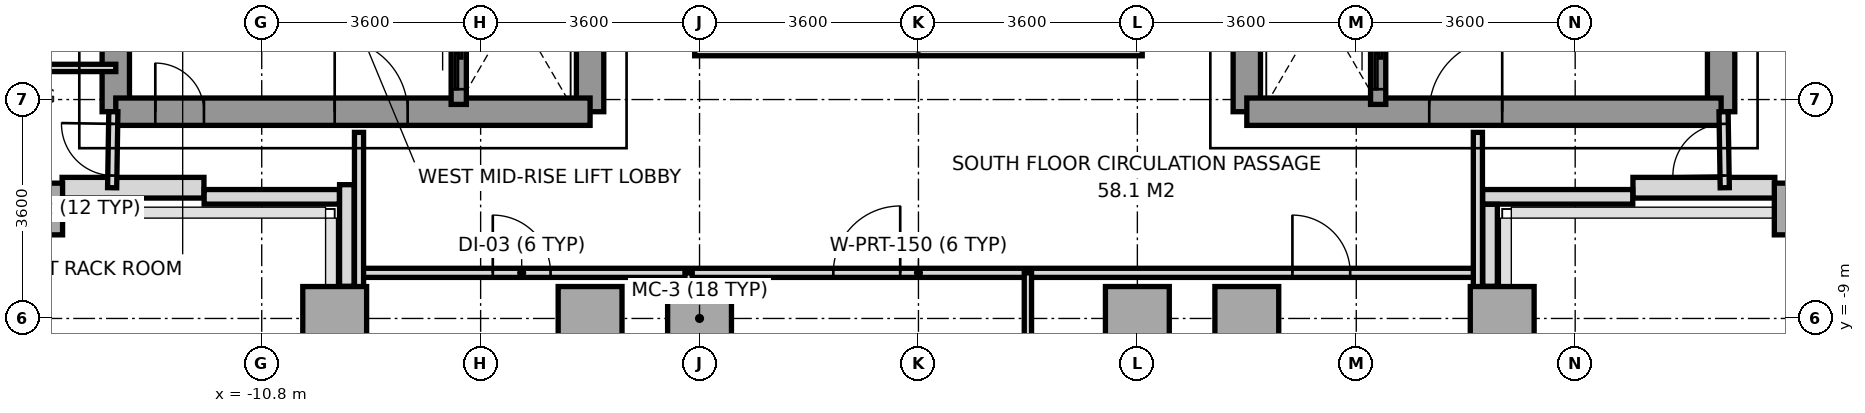
"""IFC4 building model, lengths in metres.
Left out: names, types, materials, properties, quantities, classifications, styles, units other than length and angle.
Written with IfcOpenShell. Run it as: python <this file> out.ifc"""

import sys

from ifc_helpers import new_model, si_unit, direction, frame, frame_2d, origin, origin_2d, place, context, subcontext, project, spatial, rectangle, extrude, source, transform, mapped, element, fill, save


model = new_model("IFC4")
c1 = context("Model", 3, precision=1e-05, world=origin(), true_north=direction((0.0, 1.0)))
c2 = subcontext(c1, "Body", "Model", "MODEL_VIEW")
j1 = project(units=[si_unit("LENGTHUNIT", "METRE"), si_unit("PLANEANGLEUNIT", "RADIAN")], contexts=[c1])
p1 = place(None, origin())
s1 = spatial("IfcSite", under=j1, at=p1, CompositionType="ELEMENT")
p2 = place(p1, origin())
s2 = spatial("IfcBuilding", under=s1, at=p2, CompositionType="ELEMENT")
p3 = place(p2, frame((0.0, 0.0, 148.2)))
s3 = spatial("IfcBuildingStorey", under=s2, at=p3, CompositionType="ELEMENT", Elevation=148.2)
m1 = source(origin(), c2, "Body", "SweptSolid", [
    extrude(rectangle(XDim=0.65, YDim=0.85, at=origin_2d()), origin(), (0.0, 0.0, 1.0), 3.14),
])
p4 = place(p3, frame((-14.4, -7.2, 0.0), z_axis=(0.0, 0.0, 1.0), x_axis=(1.0, 0.0, 0.0)))
e1 = element("IfcColumn", 1, at=p4, inside=s3, PredefinedType="COLUMN", context=c2, shape_type="MappedRepresentation", body=[
    mapped(m1, transform((0.0, 0.0, 0.0), x_axis=(1.0, 0.0, 0.0), y_axis=(0.0, 1.0, 0.0), z_axis=(0.0, 0.0, 1.0), scale=1.0)),
])
m2 = source(origin(), c2, "Body", "SweptSolid", [
    extrude(rectangle(XDim=1.05, YDim=1.05, at=origin_2d()), origin(), (0.0, 0.0, 1.0), 3.14),
])
for number, where, z_axis, x_axis in (
    (2, (-9.6, -9.0, 0.0), (0.0, 0.0, 1.0), (1.0, 0.0, 0.0)),
    (3, (-5.4, -9.0, 0.0), (0.0, 0.0, 1.0), (1.0, 0.0, 0.0)),
    (4, (-3.6, -9.0, 0.0), (0.0, 0.0, 1.0), (1.0, 0.0, 0.0)),
    (5, (3.6, -9.0, 0.0), (0.0, 0.0, 1.0), (1.0, 0.0, 0.0)),
    (6, (5.4, -9.0, 0.0), (0.0, 0.0, 1.0), (1.0, 0.0, 0.0)),
    (7, (9.6, -9.0, 0.0), (0.0, 0.0, 1.0), (1.0, 0.0, 0.0)),
):
    element("IfcColumn", number, at=place(p3, frame(where, z_axis=z_axis, x_axis=x_axis)), inside=s3, PredefinedType="COLUMN", context=c2, shape_type="MappedRepresentation", body=[
        mapped(m2, transform((0.0, 0.0, 0.0), x_axis=(1.0, 0.0, 0.0), y_axis=(0.0, 1.0, 0.0), z_axis=(0.0, 0.0, 1.0), scale=1.0)),
    ])
p5 = place(p3, frame((14.4, -7.2, 0.0), z_axis=(0.0, 0.0, 1.0), x_axis=(1.0, 0.0, 0.0)))
e8 = element("IfcColumn", 8, at=p5, inside=s3, PredefinedType="COLUMN", context=c2, shape_type="MappedRepresentation", body=[
    mapped(m1, transform((0.0, 0.0, 0.0), x_axis=(1.0, 0.0, 0.0), y_axis=(0.0, 1.0, 0.0), z_axis=(0.0, 0.0, 1.0), scale=1.0)),
])
for number, where, z_axis, x_axis in (
    (9, (-14.083, -6.85, 0.0), (0.0, 0.0, 1.0), (1.0, 0.0, 0.0)),
    (10, (11.75, -6.85, 0.0), (0.0, 0.0, 1.0), (1.0, 0.0, 0.0)),
):
    element("IfcWall", number, at=place(p3, frame(where, z_axis=z_axis, x_axis=x_axis)), inside=s3, PredefinedType="SOLIDWALL", context=c2, shape_type="SweptSolid", body=[
        extrude(rectangle(XDim=2.333, YDim=0.34, at=frame_2d((1.167, 0.0))), origin(), (0.0, 0.0, 1.0), 3.14),
    ])
p6 = place(p3, frame((11.747, -7.0, 0.0), z_axis=(0.0, 0.0, 1.0), x_axis=(-1.0, 0.0, 0.0)))
e11 = element("IfcWall", 11, at=p6, inside=s3, PredefinedType="PARAPET", context=c2, shape_type="SweptSolid", body=[
    extrude(rectangle(XDim=2.469, YDim=0.24, at=frame_2d((1.234, 0.0))), origin(), (0.0, 0.0, 1.0), 1.15),
])
p7 = place(p3, frame((9.4, -7.123, 0.0), z_axis=(0.0, 0.0, 1.0), x_axis=(0.0, -1.0, 0.0)))
e12 = element("IfcWall", 12, at=p7, inside=s3, PredefinedType="PARAPET", context=c2, shape_type="SweptSolid", body=[
    extrude(rectangle(XDim=1.349, YDim=0.24, at=frame_2d((0.674, 0.0))), origin(), (0.0, 0.0, 1.0), 1.15),
])
p8 = place(p3, frame((-9.4, -8.472, 0.0), z_axis=(0.0, 0.0, 1.0), x_axis=(0.0, 1.0, 0.0)))
e13 = element("IfcWall", 13, at=p8, inside=s3, PredefinedType="PARAPET", context=c2, shape_type="SweptSolid", body=[
    extrude(rectangle(XDim=1.672, YDim=0.24, at=frame_2d((0.836, 0.0))), origin(), (0.0, 0.0, 1.0), 1.15),
])
p9 = place(p3, frame((-9.523, -7.0, 0.0), z_axis=(0.0, 0.0, 1.0), x_axis=(-1.0, 0.0, 0.0)))
e14 = element("IfcWall", 14, at=p9, inside=s3, PredefinedType="PARAPET", context=c2, shape_type="SweptSolid", body=[
    extrude(rectangle(XDim=2.224, YDim=0.24, at=frame_2d((1.112, 0.0))), origin(), (0.0, 0.0, 1.0), 1.15),
])
p10 = place(p3, frame((-13.2, -5.6, 0.0), z_axis=(0.0, 0.0, 1.0), x_axis=(0.0, 1.0, 0.0)))
e15 = element("IfcWall", 15, at=p10, inside=s3, PredefinedType="SHEAR", context=c2, shape_type="SweptSolid", body=[
    extrude(rectangle(XDim=11.2, YDim=0.45, at=frame_2d((5.6, 0.0))), origin(), (0.0, 0.0, 1.0), 3.14),
])
p11 = place(p3, frame((-5.4, -5.6, 0.0), z_axis=(0.0, 0.0, 1.0), x_axis=(0.0, 1.0, 0.0)))
e16 = element("IfcWall", 16, at=p11, inside=s3, PredefinedType="SHEAR", context=c2, shape_type="SweptSolid", body=[
    extrude(rectangle(XDim=12.5, YDim=0.45, at=frame_2d((6.25, 0.0))), origin(), (0.0, 0.0, 1.0), 3.14),
])
p12 = place(p11, frame((4.55, 0.0, 0.0)))
e17 = element("IfcOpeningElement", 17, at=p12, cuts=e16, PredefinedType="OPENING", context=c2, shape_type="SweptSolid", body=[
    extrude(rectangle(XDim=1.2, YDim=2.2, at=frame_2d((0.6, 1.1))), frame((0.0, 0.235, 0.0), z_axis=(0.0, -1.0, 0.0), x_axis=(1.0, 0.0, 0.0)), (0.0, 0.0, 1.0), 0.47),
])
p13 = place(p11, frame((6.86, 0.0, 0.0)))
e18 = element("IfcOpeningElement", 18, at=p13, cuts=e16, PredefinedType="OPENING", context=c2, shape_type="SweptSolid", body=[
    extrude(rectangle(XDim=0.8, YDim=2.1, at=frame_2d((0.4, 1.05))), frame((0.0, 0.235, 0.0), z_axis=(0.0, -1.0, 0.0), x_axis=(1.0, 0.0, 0.0)), (0.0, 0.0, 1.0), 0.47),
])
p14 = place(p3, frame((-13.2, -5.6, 0.0), z_axis=(0.0, 0.0, 1.0), x_axis=(1.0, 0.0, 0.0)))
e19 = element("IfcWall", 19, at=p14, inside=s3, PredefinedType="SHEAR", context=c2, shape_type="SweptSolid", body=[
    extrude(rectangle(XDim=7.8, YDim=0.45, at=frame_2d((3.9, 0.0))), origin(), (0.0, 0.0, 1.0), 3.14),
])
p15 = place(p14, frame((3.6, 0.0, 0.0)))
e20 = element("IfcOpeningElement", 20, at=p15, cuts=e19, PredefinedType="OPENING", context=c2, shape_type="SweptSolid", body=[
    extrude(rectangle(XDim=1.2, YDim=2.2, at=frame_2d((0.6, 1.1))), frame((0.0, 0.235, 0.0), z_axis=(0.0, -1.0, 0.0), x_axis=(1.0, 0.0, 0.0)), (0.0, 0.0, 1.0), 0.47),
])
p16 = place(p14, frame((0.65, 0.0, 0.0)))
e21 = element("IfcOpeningElement", 21, at=p16, cuts=e19, PredefinedType="OPENING", context=c2, shape_type="SweptSolid", body=[
    extrude(rectangle(XDim=0.8, YDim=2.1, at=frame_2d((0.4, 1.05))), frame((0.0, 0.235, 0.0), z_axis=(0.0, -1.0, 0.0), x_axis=(1.0, 0.0, 0.0)), (0.0, 0.0, 1.0), 0.47),
])
p17 = place(p3, frame((13.2, -5.6, 0.0), z_axis=(0.0, 0.0, 1.0), x_axis=(0.0, 1.0, 0.0)))
e22 = element("IfcWall", 22, at=p17, inside=s3, PredefinedType="SHEAR", context=c2, shape_type="SweptSolid", body=[
    extrude(rectangle(XDim=11.2, YDim=0.45, at=frame_2d((5.6, 0.0))), origin(), (0.0, 0.0, 1.0), 3.14),
])
p18 = place(p3, frame((5.4, -5.6, 0.0), z_axis=(0.0, 0.0, 1.0), x_axis=(0.0, 1.0, 0.0)))
e23 = element("IfcWall", 23, at=p18, inside=s3, PredefinedType="SHEAR", context=c2, shape_type="SweptSolid", body=[
    extrude(rectangle(XDim=12.5, YDim=0.45, at=frame_2d((6.25, 0.0))), origin(), (0.0, 0.0, 1.0), 3.14),
])
p19 = place(p18, frame((4.55, 0.0, 0.0)))
e24 = element("IfcOpeningElement", 24, at=p19, cuts=e23, PredefinedType="OPENING", context=c2, shape_type="SweptSolid", body=[
    extrude(rectangle(XDim=1.2, YDim=2.2, at=frame_2d((0.6, 1.1))), frame((0.0, 0.235, 0.0), z_axis=(0.0, -1.0, 0.0), x_axis=(1.0, 0.0, 0.0)), (0.0, 0.0, 1.0), 0.47),
])
p20 = place(p18, frame((6.86, 0.0, 0.0)))
e25 = element("IfcOpeningElement", 25, at=p20, cuts=e23, PredefinedType="OPENING", context=c2, shape_type="SweptSolid", body=[
    extrude(rectangle(XDim=0.8, YDim=2.1, at=frame_2d((0.4, 1.05))), frame((0.0, 0.235, 0.0), z_axis=(0.0, -1.0, 0.0), x_axis=(1.0, 0.0, 0.0)), (0.0, 0.0, 1.0), 0.47),
])
p21 = place(p3, frame((5.4, -5.6, 0.0), z_axis=(0.0, 0.0, 1.0), x_axis=(1.0, 0.0, 0.0)))
e26 = element("IfcWall", 26, at=p21, inside=s3, PredefinedType="SHEAR", context=c2, shape_type="SweptSolid", body=[
    extrude(rectangle(XDim=7.8, YDim=0.45, at=frame_2d((3.9, 0.0))), origin(), (0.0, 0.0, 1.0), 3.14),
])
p22 = place(p21, frame((3.0, 0.0, 0.0)))
e27 = element("IfcOpeningElement", 27, at=p22, cuts=e26, PredefinedType="OPENING", context=c2, shape_type="SweptSolid", body=[
    extrude(rectangle(XDim=1.2, YDim=2.2, at=frame_2d((0.6, 1.1))), frame((0.0, 0.235, 0.0), z_axis=(0.0, -1.0, 0.0), x_axis=(1.0, 0.0, 0.0)), (0.0, 0.0, 1.0), 0.47),
])
p23 = place(p3, frame((-7.56, -5.48, 0.0), z_axis=(0.0, 0.0, 1.0), x_axis=(0.0, 1.0, 0.0)))
e28 = element("IfcWall", 28, at=p23, inside=s3, PredefinedType="SOLIDWALL", context=c2, shape_type="SweptSolid", body=[
    extrude(rectangle(XDim=1.6, YDim=0.25, at=frame_2d((0.8, 0.0))), origin(), (0.0, 0.0, 1.0), 3.14),
])
p24 = place(p23, frame((0.25, 0.0, 0.0)))
e29 = element("IfcOpeningElement", 29, at=p24, cuts=e28, PredefinedType="OPENING", context=c2, shape_type="SweptSolid", body=[
    extrude(rectangle(XDim=1.1, YDim=2.2, at=frame_2d((0.55, 1.1))), frame((0.0, 0.135, 0.0), z_axis=(0.0, -1.0, 0.0), x_axis=(1.0, 0.0, 0.0)), (0.0, 0.0, 1.0), 0.27),
])
p25 = place(p3, frame((7.56, -5.48, 0.0), z_axis=(0.0, 0.0, 1.0), x_axis=(0.0, 1.0, 0.0)))
e30 = element("IfcWall", 30, at=p25, inside=s3, PredefinedType="SOLIDWALL", context=c2, shape_type="SweptSolid", body=[
    extrude(rectangle(XDim=1.6, YDim=0.25, at=frame_2d((0.8, 0.0))), origin(), (0.0, 0.0, 1.0), 3.14),
])
p26 = place(p25, frame((0.25, 0.0, 0.0)))
e31 = element("IfcOpeningElement", 31, at=p26, cuts=e30, PredefinedType="OPENING", context=c2, shape_type="SweptSolid", body=[
    extrude(rectangle(XDim=1.1, YDim=2.2, at=frame_2d((0.55, 1.1))), frame((0.0, 0.135, 0.0), z_axis=(0.0, -1.0, 0.0), x_axis=(1.0, 0.0, 0.0)), (0.0, 0.0, 1.0), 0.27),
])
p27 = place(p3, frame((-9.2, -8.25, 0.0), z_axis=(0.0, 0.0, 1.0), x_axis=(1.0, 0.0, 0.0)))
e32 = element("IfcWall", 32, at=p27, inside=s3, PredefinedType="PARTITIONING", context=c2, shape_type="SweptSolid", body=[
    extrude(rectangle(XDim=18.4, YDim=0.15, at=frame_2d((9.2, 0.0))), origin(), (0.0, 0.0, 1.0), 2.69),
])
p28 = place(p27, frame((2.2, 0.0, 0.0)))
e33 = element("IfcOpeningElement", 33, at=p28, cuts=e32, PredefinedType="OPENING", context=c2, shape_type="SweptSolid", body=[
    extrude(rectangle(XDim=0.95, YDim=2.15, at=frame_2d((0.475, 1.075))), frame((0.0, 0.085, 0.0), z_axis=(0.0, -1.0, 0.0), x_axis=(1.0, 0.0, 0.0)), (0.0, 0.0, 1.0), 0.17),
])
p29 = place(p27, frame((7.8, 0.0, 0.0)))
e34 = element("IfcOpeningElement", 34, at=p29, cuts=e32, PredefinedType="OPENING", context=c2, shape_type="SweptSolid", body=[
    extrude(rectangle(XDim=1.1, YDim=2.2, at=frame_2d((0.55, 1.1))), frame((0.0, 0.085, 0.0), z_axis=(0.0, -1.0, 0.0), x_axis=(1.0, 0.0, 0.0)), (0.0, 0.0, 1.0), 0.17),
])
p30 = place(p27, frame((15.35, 0.0, 0.0)))
e35 = element("IfcOpeningElement", 35, at=p30, cuts=e32, PredefinedType="OPENING", context=c2, shape_type="SweptSolid", body=[
    extrude(rectangle(XDim=0.95, YDim=2.15, at=frame_2d((0.475, 1.075))), frame((0.0, 0.085, 0.0), z_axis=(0.0, -1.0, 0.0), x_axis=(1.0, 0.0, 0.0)), (0.0, 0.0, 1.0), 0.17),
])
for number, where, z_axis, x_axis in (
    (36, (-9.2, -15.68, 0.0), (0.0, 0.0, 1.0), (0.0, 1.0, 0.0)),
    (37, (9.2, -15.68, 0.0), (0.0, 0.0, 1.0), (0.0, 1.0, 0.0)),
):
    element("IfcWall", number, at=place(p3, frame(where, z_axis=z_axis, x_axis=x_axis)), inside=s3, PredefinedType="PARTITIONING", context=c2, shape_type="SweptSolid", body=[
        extrude(rectangle(XDim=9.74, YDim=0.15, at=frame_2d((4.87, 0.0))), origin(), (0.0, 0.0, 1.0), 2.64),
    ])
for number, where, z_axis, x_axis in (
    (38, (-3.78, -24.65, 0.0), (0.0, 0.0, 1.0), (0.0, 1.0, 0.0)),
    (39, (1.8, -24.65, 0.0), (0.0, 0.0, 1.0), (0.0, 1.0, 0.0)),
):
    element("IfcWall", number, at=place(p3, frame(where, z_axis=z_axis, x_axis=x_axis)), inside=s3, PredefinedType="PARTITIONING", context=c2, shape_type="SweptSolid", body=[
        extrude(rectangle(XDim=16.4, YDim=0.12, at=frame_2d((8.2, 0.0))), origin(), (0.0, 0.0, 1.0), 2.64),
    ])
p31 = place(p3, frame((-13.26, -6.85, 0.0), z_axis=(0.0, 0.0, 1.0), x_axis=(0.016013571389, 0.999871774545, 0.0)))
e40 = element("IfcWall", 40, at=p31, inside=s3, PredefinedType="PARTITIONING", context=c2, shape_type="SweptSolid", body=[
    extrude(rectangle(XDim=1.25, YDim=0.15, at=frame_2d((0.625, 0.0))), origin(), (0.0, 0.0, 1.0), 3.14),
])
p32 = place(p31, frame((0.2, 0.0, 0.0)))
e41 = element("IfcOpeningElement", 41, at=p32, cuts=e40, PredefinedType="OPENING", context=c2, shape_type="SweptSolid", body=[
    extrude(rectangle(XDim=0.85, YDim=2.1, at=frame_2d((0.425, 1.05))), frame((0.0, 0.085, 0.0), z_axis=(0.0, -1.0, 0.0), x_axis=(1.0, 0.0, 0.0)), (0.0, 0.0, 1.0), 0.17),
])
p33 = place(p3, frame((-19.17, -4.88, 0.0), z_axis=(0.0, 0.0, 1.0), x_axis=(1.0, 0.0, 0.0)))
e42 = element("IfcWall", 42, at=p33, inside=s3, PredefinedType="PARTITIONING", context=c2, shape_type="SweptSolid", body=[
    extrude(rectangle(XDim=5.97, YDim=0.12, at=frame_2d((2.985, 0.0))), origin(), (0.0, 0.0, 1.0), 2.69),
])
p34 = place(p33, frame((1.45, 0.0, 0.0)))
e43 = element("IfcOpeningElement", 43, at=p34, cuts=e42, PredefinedType="OPENING", context=c2, shape_type="SweptSolid", body=[
    extrude(rectangle(XDim=0.95, YDim=2.15, at=frame_2d((0.475, 1.075))), frame((0.0, 0.07, 0.0), z_axis=(0.0, -1.0, 0.0), x_axis=(1.0, 0.0, 0.0)), (0.0, 0.0, 1.0), 0.14),
])
p35 = place(p3, frame((13.26, -6.85, 0.0), z_axis=(0.0, 0.0, 1.0), x_axis=(-0.016013571389, 0.999871774545, 0.0)))
e44 = element("IfcWall", 44, at=p35, inside=s3, PredefinedType="PARTITIONING", context=c2, shape_type="SweptSolid", body=[
    extrude(rectangle(XDim=1.25, YDim=0.15, at=frame_2d((0.625, 0.0))), origin(), (0.0, 0.0, 1.0), 3.14),
])
p36 = place(p35, frame((0.2, 0.0, 0.0)))
e45 = element("IfcOpeningElement", 45, at=p36, cuts=e44, PredefinedType="OPENING", context=c2, shape_type="SweptSolid", body=[
    extrude(rectangle(XDim=0.85, YDim=2.1, at=frame_2d((0.425, 1.05))), frame((0.0, 0.085, 0.0), z_axis=(0.0, -1.0, 0.0), x_axis=(1.0, 0.0, 0.0)), (0.0, 0.0, 1.0), 0.17),
])
p37 = place(p3, frame((-3.68, -4.56, 0.0), z_axis=(0.0, 0.0, 1.0), x_axis=(1.0, 0.0, 0.0)))
e46 = element("IfcWall", 46, at=p37, inside=s3, PredefinedType="PARAPET", context=c2, shape_type="SweptSolid", body=[
    extrude(rectangle(XDim=7.36, YDim=0.24, at=frame_2d((3.68, 0.0))), origin(), (0.0, 0.0, 1.0), 1.15),
])
m3 = source(origin(), c2, "Body", "SweptSolid", [
    extrude(rectangle(XDim=1.2, YDim=2.2, at=frame_2d((0.6, 1.1))), frame((0.0, 0.025, 0.0), z_axis=(0.0, -1.0, 0.0), x_axis=(1.0, 0.0, 0.0)), (0.0, 0.0, 1.0), 0.05),
])
p38 = place(p15, origin())
e47 = element("IfcDoor", 47, at=p38, inside=s3, OperationType="SINGLE_SWING_LEFT", PredefinedType="DOOR", context=c2, shape_type="MappedRepresentation", body=[
    mapped(m3, transform((0.0, 0.0, 0.0), x_axis=(1.0, 0.0, 0.0), y_axis=(0.0, 1.0, 0.0), z_axis=(0.0, 0.0, 1.0), scale=1.0)),
])
fill(e20, e47)
p39 = place(p22, origin())
e48 = element("IfcDoor", 48, at=p39, inside=s3, OperationType="SINGLE_SWING_RIGHT", PredefinedType="DOOR", context=c2, shape_type="MappedRepresentation", body=[
    mapped(m3, transform((0.0, 0.0, 0.0), x_axis=(1.0, 0.0, 0.0), y_axis=(0.0, 1.0, 0.0), z_axis=(0.0, 0.0, 1.0), scale=1.0)),
])
fill(e27, e48)
m4 = source(origin(), c2, "Body", "SweptSolid", [
    extrude(rectangle(XDim=0.8, YDim=2.1, at=frame_2d((0.4, 1.05))), frame((0.0, 0.025, 0.0), z_axis=(0.0, -1.0, 0.0), x_axis=(1.0, 0.0, 0.0)), (0.0, 0.0, 1.0), 0.05),
])
p40 = place(p16, origin())
e49 = element("IfcDoor", 49, at=p40, inside=s3, OperationType="SINGLE_SWING_LEFT", PredefinedType="DOOR", context=c2, shape_type="MappedRepresentation", body=[
    mapped(m4, transform((0.0, 0.0, 0.0), x_axis=(1.0, 0.0, 0.0), y_axis=(0.0, 1.0, 0.0), z_axis=(0.0, 0.0, 1.0), scale=1.0)),
])
fill(e21, e49)
m5 = source(origin(), c2, "Body", "SweptSolid", [
    extrude(rectangle(XDim=1.1, YDim=2.2, at=frame_2d((0.55, 1.1))), frame((0.0, 0.025, 0.0), z_axis=(0.0, -1.0, 0.0), x_axis=(1.0, 0.0, 0.0)), (0.0, 0.0, 1.0), 0.05),
])
p41 = place(p24, origin())
e50 = element("IfcDoor", 50, at=p41, inside=s3, OperationType="SLIDING_TO_LEFT", PredefinedType="DOOR", context=c2, shape_type="MappedRepresentation", body=[
    mapped(m5, transform((0.0, 0.0, 0.0), x_axis=(1.0, 0.0, 0.0), y_axis=(0.0, 1.0, 0.0), z_axis=(0.0, 0.0, 1.0), scale=1.0)),
])
fill(e29, e50)
p42 = place(p26, origin())
e51 = element("IfcDoor", 51, at=p42, inside=s3, OperationType="SLIDING_TO_LEFT", PredefinedType="DOOR", context=c2, shape_type="MappedRepresentation", body=[
    mapped(m5, transform((0.0, 0.0, 0.0), x_axis=(1.0, 0.0, 0.0), y_axis=(0.0, 1.0, 0.0), z_axis=(0.0, 0.0, 1.0), scale=1.0)),
])
fill(e31, e51)
m6 = source(origin(), c2, "Body", "SweptSolid", [
    extrude(rectangle(XDim=0.95, YDim=2.15, at=frame_2d((0.475, 1.075))), frame((0.0, 0.025, 0.0), z_axis=(0.0, -1.0, 0.0), x_axis=(1.0, 0.0, 0.0)), (0.0, 0.0, 1.0), 0.05),
])
p43 = place(p28, origin())
e52 = element("IfcDoor", 52, at=p43, inside=s3, OperationType="SINGLE_SWING_LEFT", PredefinedType="DOOR", context=c2, shape_type="MappedRepresentation", body=[
    mapped(m6, transform((0.0, 0.0, 0.0), x_axis=(1.0, 0.0, 0.0), y_axis=(0.0, 1.0, 0.0), z_axis=(0.0, 0.0, 1.0), scale=1.0)),
])
fill(e33, e52)
p44 = place(p29, origin())
e53 = element("IfcDoor", 53, at=p44, inside=s3, OperationType="SINGLE_SWING_RIGHT", PredefinedType="DOOR", context=c2, shape_type="MappedRepresentation", body=[
    mapped(m5, transform((0.0, 0.0, 0.0), x_axis=(1.0, 0.0, 0.0), y_axis=(0.0, 1.0, 0.0), z_axis=(0.0, 0.0, 1.0), scale=1.0)),
])
fill(e34, e53)
p45 = place(p30, origin())
e54 = element("IfcDoor", 54, at=p45, inside=s3, OperationType="SINGLE_SWING_LEFT", PredefinedType="DOOR", context=c2, shape_type="MappedRepresentation", body=[
    mapped(m6, transform((0.0, 0.0, 0.0), x_axis=(1.0, 0.0, 0.0), y_axis=(0.0, 1.0, 0.0), z_axis=(0.0, 0.0, 1.0), scale=1.0)),
])
fill(e35, e54)
m7 = source(origin(), c2, "Body", "SweptSolid", [
    extrude(rectangle(XDim=0.85, YDim=2.1, at=frame_2d((0.425, 1.05))), frame((0.0, 0.025, 0.0), z_axis=(0.0, -1.0, 0.0), x_axis=(1.0, 0.0, 0.0)), (0.0, 0.0, 1.0), 0.05),
])
p46 = place(p32, origin())
e55 = element("IfcDoor", 55, at=p46, inside=s3, OperationType="SINGLE_SWING_RIGHT", PredefinedType="DOOR", context=c2, shape_type="MappedRepresentation", body=[
    mapped(m7, transform((0.0, 0.0, 0.0), x_axis=(1.0, 0.0, 0.0), y_axis=(0.0, 1.0, 0.0), z_axis=(0.0, 0.0, 1.0), scale=1.0)),
])
fill(e41, e55)
p47 = place(p36, origin())
e56 = element("IfcDoor", 56, at=p47, inside=s3, OperationType="SINGLE_SWING_LEFT", PredefinedType="DOOR", context=c2, shape_type="MappedRepresentation", body=[
    mapped(m7, transform((0.0, 0.0, 0.0), x_axis=(1.0, 0.0, 0.0), y_axis=(0.0, 1.0, 0.0), z_axis=(0.0, 0.0, 1.0), scale=1.0)),
])
fill(e45, e56)
save(model, sys.argv[1])
